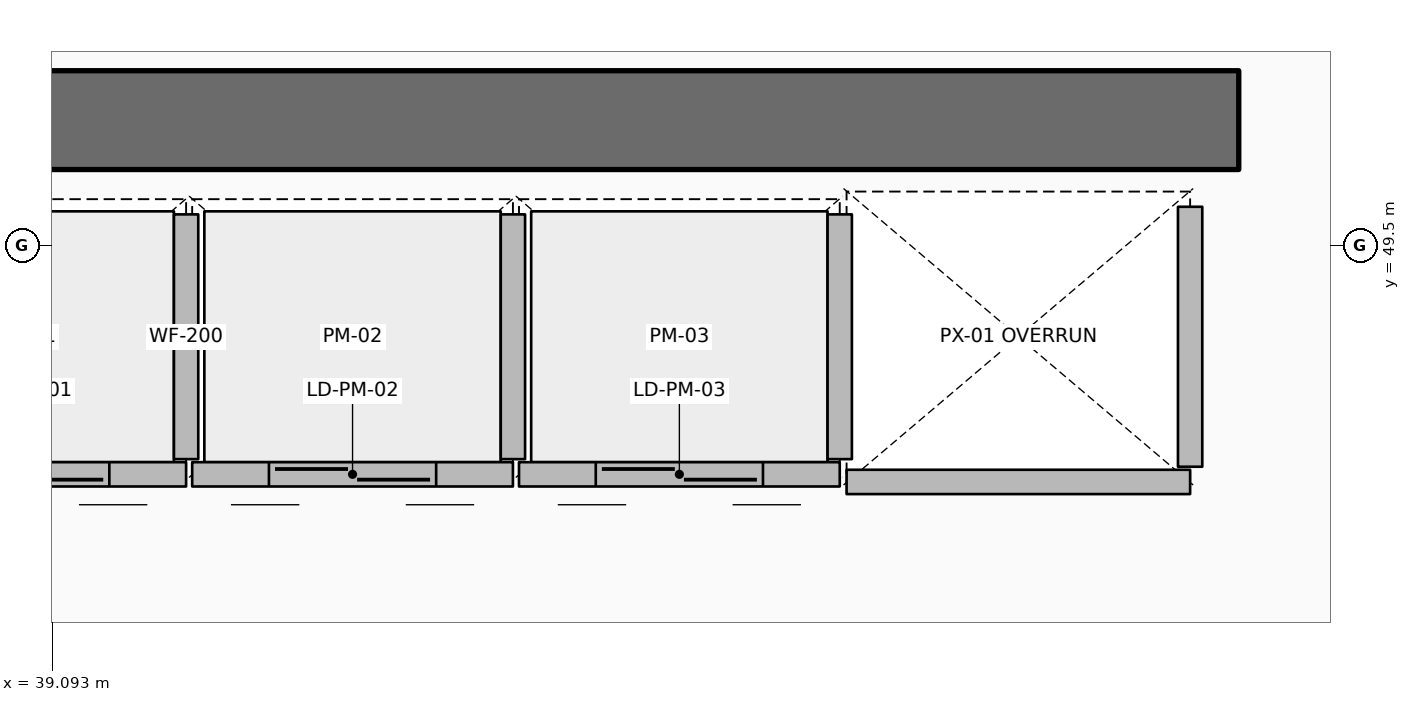
"""IFC4 building model, lengths in metres.
Left out: names, types, materials, properties, quantities, classifications, styles, units other than length and angle.
Written with IfcOpenShell. Run it as: python <this file> out.ifc"""

import sys

from ifc_helpers import new_model, si_unit, direction, frame, frame_2d, origin, place, context, subcontext, project, spatial, rectangle, extrude, element, fill, save


model = new_model("IFC4")
c1 = context("Model", 3, precision=1e-05, world=origin(), true_north=direction((0.0, 1.0)))
c2 = subcontext(c1, "Body", "Model", "MODEL_VIEW")
j1 = project(units=[si_unit("LENGTHUNIT", "METRE"), si_unit("PLANEANGLEUNIT", "RADIAN")], contexts=[c1])
p1 = place(None, origin())
s1 = spatial("IfcSite", under=j1, at=p1, CompositionType="ELEMENT")
p2 = place(p1, origin())
s2 = spatial("IfcBuilding", under=s1, at=p2, CompositionType="ELEMENT")
p3 = place(p2, frame((0.0, 0.0, 225.3)))
s3 = spatial("IfcBuildingStorey", under=s2, at=p3, CompositionType="ELEMENT", Elevation=225.3)
p4 = place(p3, frame((37.15, 50.325, 0.0), z_axis=(0.0, 0.0, 1.0), x_axis=(1.0, 0.0, 0.0)))
e1 = element("IfcWall", 1, at=p4, inside=s3, PredefinedType="SHEAR", context=c2, shape_type="SweptSolid", body=[
    extrude(rectangle(XDim=9.75, YDim=0.65, at=frame_2d((4.875, 0.0))), origin(), (0.0, 0.0, 1.0), 6.6),
])
p5 = place(p3, frame((39.975, 47.995, 0.0), z_axis=(0.0, 0.0, 1.0), x_axis=(-1.0, 0.0, 0.0)))
e2 = element("IfcWall", 2, at=p5, inside=s3, PredefinedType="PARTITIONING", context=c2, shape_type="SweptSolid", body=[
    extrude(rectangle(XDim=2.11, YDim=0.16, at=frame_2d((1.055, 0.0))), origin(), (0.0, 0.0, 1.0), 6.28),
])
p6 = place(p5, frame((0.505, 0.0, 0.0)))
e3 = element("IfcOpeningElement", 3, at=p6, cuts=e2, PredefinedType="OPENING", context=c2, shape_type="SweptSolid", body=[
    extrude(rectangle(XDim=1.1, YDim=2.1, at=frame_2d((0.55, 1.05))), frame((0.0, 0.09, 0.0), z_axis=(0.0, -1.0, 0.0), x_axis=(1.0, 0.0, 0.0)), (0.0, 0.0, 1.0), 0.18),
])
p7 = place(p3, frame((39.975, 48.095, 0.0), z_axis=(0.0, 0.0, 1.0), x_axis=(0.0, 1.0, 0.0)))
e4 = element("IfcWall", 4, at=p7, inside=s3, PredefinedType="PARTITIONING", context=c2, shape_type="SweptSolid", body=[
    extrude(rectangle(XDim=1.61, YDim=0.16, at=frame_2d((0.805, 0.0))), origin(), (0.0, 0.0, 1.0), 6.28),
])
p8 = place(p3, frame((42.125, 47.995, 0.0), z_axis=(0.0, 0.0, 1.0), x_axis=(-1.0, 0.0, 0.0)))
e5 = element("IfcWall", 5, at=p8, inside=s3, PredefinedType="PARTITIONING", context=c2, shape_type="SweptSolid", body=[
    extrude(rectangle(XDim=2.11, YDim=0.16, at=frame_2d((1.055, 0.0))), origin(), (0.0, 0.0, 1.0), 6.28),
])
p9 = place(p8, frame((0.505, 0.0, 0.0)))
e6 = element("IfcOpeningElement", 6, at=p9, cuts=e5, PredefinedType="OPENING", context=c2, shape_type="SweptSolid", body=[
    extrude(rectangle(XDim=1.1, YDim=2.1, at=frame_2d((0.55, 1.05))), frame((0.0, 0.09, 0.0), z_axis=(0.0, -1.0, 0.0), x_axis=(1.0, 0.0, 0.0)), (0.0, 0.0, 1.0), 0.18),
])
p10 = place(p3, frame((42.125, 48.095, 0.0), z_axis=(0.0, 0.0, 1.0), x_axis=(0.0, 1.0, 0.0)))
e7 = element("IfcWall", 7, at=p10, inside=s3, PredefinedType="PARTITIONING", context=c2, shape_type="SweptSolid", body=[
    extrude(rectangle(XDim=1.61, YDim=0.16, at=frame_2d((0.805, 0.0))), origin(), (0.0, 0.0, 1.0), 6.28),
])
p11 = place(p3, frame((44.275, 47.995, 0.0), z_axis=(0.0, 0.0, 1.0), x_axis=(-1.0, 0.0, 0.0)))
e8 = element("IfcWall", 8, at=p11, inside=s3, PredefinedType="PARTITIONING", context=c2, shape_type="SweptSolid", body=[
    extrude(rectangle(XDim=2.11, YDim=0.16, at=frame_2d((1.055, 0.0))), origin(), (0.0, 0.0, 1.0), 6.28),
])
p12 = place(p11, frame((0.505, 0.0, 0.0)))
e9 = element("IfcOpeningElement", 9, at=p12, cuts=e8, PredefinedType="OPENING", context=c2, shape_type="SweptSolid", body=[
    extrude(rectangle(XDim=1.1, YDim=2.1, at=frame_2d((0.55, 1.05))), frame((0.0, 0.09, 0.0), z_axis=(0.0, -1.0, 0.0), x_axis=(1.0, 0.0, 0.0)), (0.0, 0.0, 1.0), 0.18),
])
p13 = place(p3, frame((44.275, 48.095, 0.0), z_axis=(0.0, 0.0, 1.0), x_axis=(0.0, 1.0, 0.0)))
e10 = element("IfcWall", 10, at=p13, inside=s3, PredefinedType="PARTITIONING", context=c2, shape_type="SweptSolid", body=[
    extrude(rectangle(XDim=1.61, YDim=0.16, at=frame_2d((0.805, 0.0))), origin(), (0.0, 0.0, 1.0), 6.28),
])
p14 = place(p3, frame((46.58, 47.945, 0.0), z_axis=(0.0, 0.0, 1.0), x_axis=(-1.0, 0.0, 0.0)))
e11 = element("IfcWall", 11, at=p14, inside=s3, PredefinedType="PARTITIONING", context=c2, shape_type="SweptSolid", body=[
    extrude(rectangle(XDim=2.26, YDim=0.16, at=frame_2d((1.13, 0.0))), origin(), (0.0, 0.0, 1.0), 6.28),
])
p15 = place(p3, frame((46.58, 48.045, 0.0), z_axis=(0.0, 0.0, 1.0), x_axis=(0.0, 1.0, 0.0)))
e12 = element("IfcWall", 12, at=p15, inside=s3, PredefinedType="PARTITIONING", context=c2, shape_type="SweptSolid", body=[
    extrude(rectangle(XDim=1.71, YDim=0.16, at=frame_2d((0.855, 0.0))), origin(), (0.0, 0.0, 1.0), 6.28),
])
p16 = place(p6, origin())
e13 = element("IfcDoor", 13, at=p16, inside=s3, OperationType="DOUBLE_DOOR_SLIDING", PredefinedType="DOOR", context=c2, shape_type="SweptSolid", body=[
    extrude(rectangle(XDim=1.1, YDim=2.1, at=frame_2d((0.55, 1.05))), frame((0.0, 0.025, 0.0), z_axis=(0.0, -1.0, 0.0), x_axis=(1.0, 0.0, 0.0)), (0.0, 0.0, 1.0), 0.05),
])
fill(e3, e13)
p17 = place(p9, origin())
e14 = element("IfcDoor", 14, at=p17, inside=s3, OperationType="DOUBLE_DOOR_SLIDING", PredefinedType="DOOR", context=c2, shape_type="SweptSolid", body=[
    extrude(rectangle(XDim=1.1, YDim=2.1, at=frame_2d((0.55, 1.05))), frame((0.0, 0.025, 0.0), z_axis=(0.0, -1.0, 0.0), x_axis=(1.0, 0.0, 0.0)), (0.0, 0.0, 1.0), 0.05),
])
fill(e6, e14)
p18 = place(p12, origin())
e15 = element("IfcDoor", 15, at=p18, inside=s3, OperationType="DOUBLE_DOOR_SLIDING", PredefinedType="DOOR", context=c2, shape_type="SweptSolid", body=[
    extrude(rectangle(XDim=1.1, YDim=2.1, at=frame_2d((0.55, 1.05))), frame((0.0, 0.025, 0.0), z_axis=(0.0, -1.0, 0.0), x_axis=(1.0, 0.0, 0.0)), (0.0, 0.0, 1.0), 0.05),
])
fill(e9, e15)
save(model, sys.argv[1])
